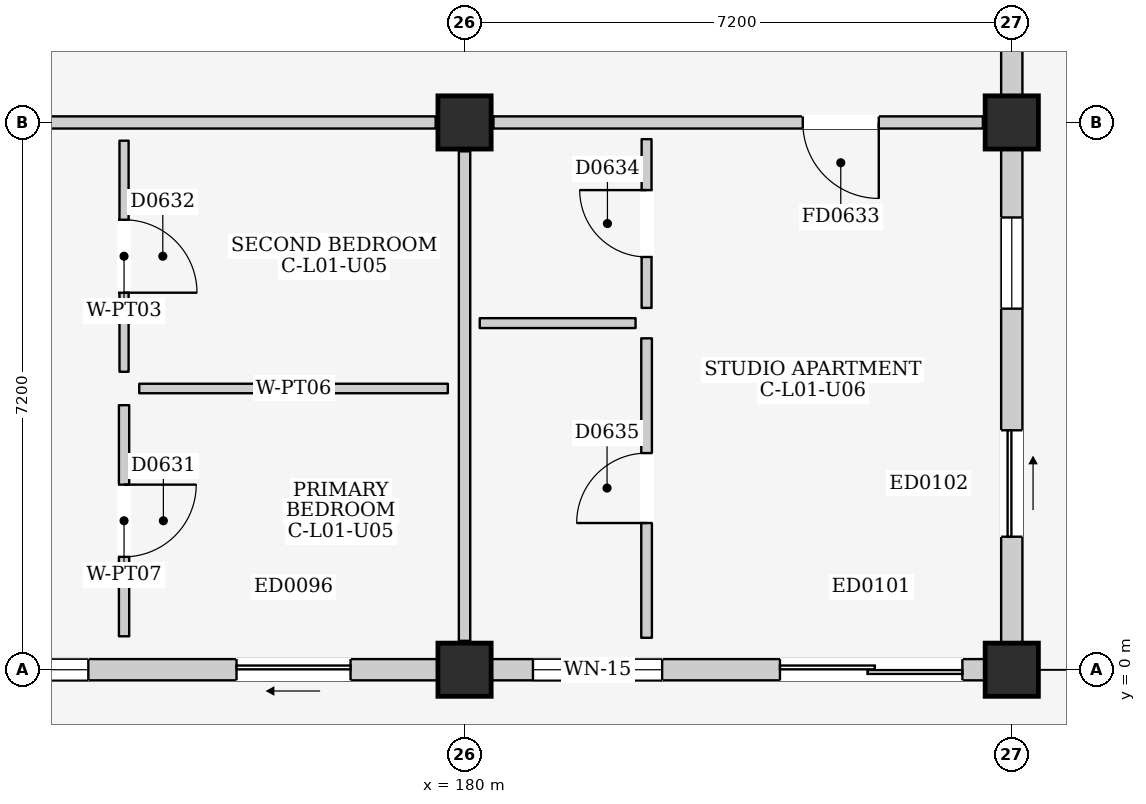
"""IFC4 building model, lengths in metres.
Left out: names, types, materials, properties, quantities, classifications, styles, units other than length and angle.
Written with IfcOpenShell. Run it as: python <this file> out.ifc"""

import sys

from ifc_helpers import new_model, si_unit, direction, frame, frame_2d, origin, origin_2d, place, context, subcontext, project, spatial, rectangle, extrude, element, fill, save


model = new_model("IFC4")
c1 = context("Model", 3, precision=1e-05, world=origin(), true_north=direction((0.0, 1.0)))
c2 = subcontext(c1, "Body", "Model", "MODEL_VIEW")
j1 = project(units=[si_unit("LENGTHUNIT", "METRE"), si_unit("PLANEANGLEUNIT", "RADIAN")], contexts=[c1])
p1 = place(None, origin())
s1 = spatial("IfcSite", under=j1, at=p1, CompositionType="ELEMENT")
p2 = place(p1, origin())
s2 = spatial("IfcBuilding", under=s1, at=p2, CompositionType="ELEMENT")
p3 = place(p2, frame((0.0, 0.0, 4.5)))
s3 = spatial("IfcBuildingStorey", under=s2, at=p3, CompositionType="ELEMENT", Elevation=4.5)
for number, where, z_axis, x_axis in (
    (1, (180.0, 0.0, 0.0), (0.0, 0.0, 1.0), (1.0, 0.0, 0.0)),
    (2, (180.0, 7.2, 0.0), (0.0, 0.0, 1.0), (1.0, 0.0, 0.0)),
    (3, (187.2, 0.0, 0.0), (0.0, 0.0, 1.0), (1.0, 0.0, 0.0)),
    (4, (187.2, 7.2, 0.0), (0.0, 0.0, 1.0), (1.0, 0.0, 0.0)),
):
    element("IfcColumn", number, at=place(p3, frame(where, z_axis=z_axis, x_axis=x_axis)), inside=s3, PredefinedType="COLUMN", context=c2, shape_type="SweptSolid", body=[
        extrude(rectangle(XDim=0.7, YDim=0.7, at=origin_2d()), origin(), (0.0, 0.0, 1.0), 4.5),
    ])
p4 = place(p3, frame((173.15, 0.0, 0.0), z_axis=(0.0, 0.0, 1.0), x_axis=(1.0, 0.0, 0.0)))
e5 = element("IfcWall", 5, at=p4, inside=s3, PredefinedType="ELEMENTEDWALL", context=c2, shape_type="SweptSolid", body=[
    extrude(rectangle(XDim=6.5, YDim=0.28, at=frame_2d((3.25, 0.0))), origin(), (0.0, 0.0, 1.0), 3.715),
])
p5 = place(p4, frame((3.85, 0.0, 0.0)))
e6 = element("IfcOpeningElement", 6, at=p5, cuts=e5, PredefinedType="OPENING", context=c2, shape_type="SweptSolid", body=[
    extrude(rectangle(XDim=1.5, YDim=2.12, at=frame_2d((0.75, 1.06))), frame((0.0, 0.155, 0.0), z_axis=(0.0, -1.0, 0.0), x_axis=(1.0, 0.0, 0.0)), (0.0, 0.0, 1.0), 0.31),
])
p6 = place(p4, frame((0.55, 0.0, 0.9)))
e7 = element("IfcOpeningElement", 7, at=p6, cuts=e5, PredefinedType="OPENING", context=c2, shape_type="SweptSolid", body=[
    extrude(rectangle(XDim=1.35, YDim=1.5, at=frame_2d((0.675, 0.75))), frame((0.0, 0.155, 0.0), z_axis=(0.0, -1.0, 0.0), x_axis=(1.0, 0.0, 0.0)), (0.0, 0.0, 1.0), 0.31),
])
p7 = place(p3, frame((180.35, 0.0, 0.0), z_axis=(0.0, 0.0, 1.0), x_axis=(1.0, 0.0, 0.0)))
e8 = element("IfcWall", 8, at=p7, inside=s3, PredefinedType="ELEMENTEDWALL", context=c2, shape_type="SweptSolid", body=[
    extrude(rectangle(XDim=6.5, YDim=0.28, at=frame_2d((3.25, 0.0))), origin(), (0.0, 0.0, 1.0), 3.715),
])
p8 = place(p7, frame((3.8, 0.0, 0.0)))
e9 = element("IfcOpeningElement", 9, at=p8, cuts=e8, PredefinedType="OPENING", context=c2, shape_type="SweptSolid", body=[
    extrude(rectangle(XDim=2.4, YDim=2.12, at=frame_2d((1.2, 1.06))), frame((0.0, 0.155, 0.0), z_axis=(0.0, -1.0, 0.0), x_axis=(1.0, 0.0, 0.0)), (0.0, 0.0, 1.0), 0.31),
])
p9 = place(p7, frame((0.55, 0.0, 0.9)))
e10 = element("IfcOpeningElement", 10, at=p9, cuts=e8, PredefinedType="OPENING", context=c2, shape_type="SweptSolid", body=[
    extrude(rectangle(XDim=1.7, YDim=1.45, at=frame_2d((0.85, 0.725))), frame((0.0, 0.155, 0.0), z_axis=(0.0, -1.0, 0.0), x_axis=(1.0, 0.0, 0.0)), (0.0, 0.0, 1.0), 0.31),
])
p10 = place(p3, frame((187.2, 0.35, 0.0), z_axis=(0.0, 0.0, 1.0), x_axis=(0.0, 1.0, 0.0)))
e11 = element("IfcWall", 11, at=p10, inside=s3, PredefinedType="ELEMENTEDWALL", context=c2, shape_type="SweptSolid", body=[
    extrude(rectangle(XDim=6.5, YDim=0.28, at=frame_2d((3.25, 0.0))), origin(), (0.0, 0.0, 1.0), 3.715),
])
p11 = place(p10, frame((1.4, 0.0, 0.0)))
e12 = element("IfcOpeningElement", 12, at=p11, cuts=e11, PredefinedType="OPENING", context=c2, shape_type="SweptSolid", body=[
    extrude(rectangle(XDim=1.4, YDim=2.1, at=frame_2d((0.7, 1.05))), frame((0.0, 0.155, 0.0), z_axis=(0.0, -1.0, 0.0), x_axis=(1.0, 0.0, 0.0)), (0.0, 0.0, 1.0), 0.31),
])
p12 = place(p10, frame((4.4, 0.0, 0.95)))
e13 = element("IfcOpeningElement", 13, at=p12, cuts=e11, PredefinedType="OPENING", context=c2, shape_type="SweptSolid", body=[
    extrude(rectangle(XDim=1.2, YDim=1.35, at=frame_2d((0.6, 0.675))), frame((0.0, 0.155, 0.0), z_axis=(0.0, -1.0, 0.0), x_axis=(1.0, 0.0, 0.0)), (0.0, 0.0, 1.0), 0.31),
])
p13 = place(p3, frame((187.2, 7.55, 0.0), z_axis=(0.0, 0.0, 1.0), x_axis=(0.0, 1.0, 0.0)))
e14 = element("IfcWall", 14, at=p13, inside=s3, PredefinedType="ELEMENTEDWALL", context=c2, shape_type="SweptSolid", body=[
    extrude(rectangle(XDim=6.5, YDim=0.28, at=frame_2d((3.25, 0.0))), origin(), (0.0, 0.0, 1.0), 3.715),
])
p14 = place(p13, frame((3.65, 0.0, 0.0)))
e15 = element("IfcOpeningElement", 15, at=p14, cuts=e14, PredefinedType="OPENING", context=c2, shape_type="SweptSolid", body=[
    extrude(rectangle(XDim=1.4, YDim=2.1, at=frame_2d((0.7, 1.05))), frame((0.0, 0.155, 0.0), z_axis=(0.0, -1.0, 0.0), x_axis=(1.0, 0.0, 0.0)), (0.0, 0.0, 1.0), 0.31),
])
p15 = place(p3, frame((173.18, 7.2, 0.0), z_axis=(0.0, 0.0, 1.0), x_axis=(1.0, 0.0, 0.0)))
e16 = element("IfcWall", 16, at=p15, inside=s3, PredefinedType="PARTITIONING", context=c2, shape_type="SweptSolid", body=[
    extrude(rectangle(XDim=6.44, YDim=0.16, at=frame_2d((3.22, 0.0))), origin(), (0.0, 0.0, 1.0), 3.635),
])
p16 = place(p15, frame((0.18, 0.0, 0.0)))
e17 = element("IfcOpeningElement", 17, at=p16, cuts=e16, PredefinedType="OPENING", context=c2, shape_type="SweptSolid", body=[
    extrude(rectangle(XDim=1.0, YDim=2.15, at=frame_2d((0.5, 1.075))), frame((0.0, 0.095, 0.0), z_axis=(0.0, -1.0, 0.0), x_axis=(1.0, 0.0, 0.0)), (0.0, 0.0, 1.0), 0.19),
])
p17 = place(p3, frame((180.0, 0.38, 0.0), z_axis=(0.0, 0.0, 1.0), x_axis=(0.0, 1.0, 0.0)))
e18 = element("IfcWall", 18, at=p17, inside=s3, PredefinedType="PARTITIONING", context=c2, shape_type="SweptSolid", body=[
    extrude(rectangle(XDim=6.44, YDim=0.15, at=frame_2d((3.22, 0.0))), origin(), (0.0, 0.0, 1.0), 3.685),
])
p18 = place(p3, frame((175.52, 0.44, 0.0), z_axis=(0.0, 0.0, 1.0), x_axis=(0.0, 1.0, 0.0)))
e19 = element("IfcWall", 19, at=p18, inside=s3, PredefinedType="PARTITIONING", context=c2, shape_type="SweptSolid", body=[
    extrude(rectangle(XDim=3.04, YDim=0.135, at=frame_2d((1.52, 0.0))), origin(), (0.0, 0.0, 1.0), 4.25),
])
p19 = place(p18, frame((1.045, 0.0, 0.0)))
e20 = element("IfcOpeningElement", 20, at=p19, cuts=e19, PredefinedType="OPENING", context=c2, shape_type="SweptSolid", body=[
    extrude(rectangle(XDim=0.95, YDim=2.15, at=frame_2d((0.475, 1.075))), frame((0.0, 0.083, 0.0), z_axis=(0.0, -1.0, 0.0), x_axis=(1.0, 0.0, 0.0)), (0.0, 0.0, 1.0), 0.165),
])
p20 = place(p3, frame((175.72, 3.7, 0.0), z_axis=(0.0, 0.0, 1.0), x_axis=(1.0, 0.0, 0.0)))
e21 = element("IfcWall", 21, at=p20, inside=s3, PredefinedType="PARTITIONING", context=c2, shape_type="SweptSolid", body=[
    extrude(rectangle(XDim=4.06, YDim=0.125, at=frame_2d((2.03, 0.0))), origin(), (0.0, 0.0, 1.0), 4.25),
])
p21 = place(p3, frame((175.52, 3.92, 0.0), z_axis=(0.0, 0.0, 1.0), x_axis=(0.0, 1.0, 0.0)))
e22 = element("IfcWall", 22, at=p21, inside=s3, PredefinedType="PARTITIONING", context=c2, shape_type="SweptSolid", body=[
    extrude(rectangle(XDim=3.04, YDim=0.12, at=frame_2d((1.52, 0.0))), origin(), (0.0, 0.0, 1.0), 4.25),
])
p22 = place(p21, frame((1.04, 0.0, 0.0)))
e23 = element("IfcOpeningElement", 23, at=p22, cuts=e22, PredefinedType="OPENING", context=c2, shape_type="SweptSolid", body=[
    extrude(rectangle(XDim=0.96, YDim=2.15, at=frame_2d((0.48, 1.075))), frame((0.0, 0.075, 0.0), z_axis=(0.0, -1.0, 0.0), x_axis=(1.0, 0.0, 0.0)), (0.0, 0.0, 1.0), 0.15),
])
p23 = place(p3, frame((180.38, 7.2, 0.0), z_axis=(0.0, 0.0, 1.0), x_axis=(1.0, 0.0, 0.0)))
e24 = element("IfcWall", 24, at=p23, inside=s3, PredefinedType="PARTITIONING", context=c2, shape_type="SweptSolid", body=[
    extrude(rectangle(XDim=6.44, YDim=0.16, at=frame_2d((3.22, 0.0))), origin(), (0.0, 0.0, 1.0), 3.635),
])
p24 = place(p23, frame((4.07, 0.0, 0.0)))
e25 = element("IfcOpeningElement", 25, at=p24, cuts=e24, PredefinedType="OPENING", context=c2, shape_type="SweptSolid", body=[
    extrude(rectangle(XDim=1.0, YDim=2.15, at=frame_2d((0.5, 1.075))), frame((0.0, 0.095, 0.0), z_axis=(0.0, -1.0, 0.0), x_axis=(1.0, 0.0, 0.0)), (0.0, 0.0, 1.0), 0.19),
])
p25 = place(p3, frame((180.2, 4.56, 0.0), z_axis=(0.0, 0.0, 1.0), x_axis=(1.0, 0.0, 0.0)))
e26 = element("IfcWall", 26, at=p25, inside=s3, PredefinedType="PARTITIONING", context=c2, shape_type="SweptSolid", body=[
    extrude(rectangle(XDim=2.05, YDim=0.13, at=frame_2d((1.025, 0.0))), origin(), (0.0, 0.0, 1.0), 4.25),
])
p26 = place(p3, frame((182.395, 4.76, 0.0), z_axis=(0.0, 0.0, 1.0), x_axis=(0.0, 1.0, 0.0)))
e27 = element("IfcWall", 27, at=p26, inside=s3, PredefinedType="PARTITIONING", context=c2, shape_type="SweptSolid", body=[
    extrude(rectangle(XDim=2.22, YDim=0.13, at=frame_2d((1.11, 0.0))), origin(), (0.0, 0.0, 1.0), 4.25),
])
p27 = place(p26, frame((0.67, 0.0, 0.0)))
e28 = element("IfcOpeningElement", 28, at=p27, cuts=e27, PredefinedType="OPENING", context=c2, shape_type="SweptSolid", body=[
    extrude(rectangle(XDim=0.88, YDim=2.1, at=frame_2d((0.44, 1.05))), frame((0.0, 0.08, 0.0), z_axis=(0.0, -1.0, 0.0), x_axis=(1.0, 0.0, 0.0)), (0.0, 0.0, 1.0), 0.16),
])
p28 = place(p3, frame((182.395, 0.42, 0.0), z_axis=(0.0, 0.0, 1.0), x_axis=(0.0, 1.0, 0.0)))
e29 = element("IfcWall", 29, at=p28, inside=s3, PredefinedType="PARTITIONING", context=c2, shape_type="SweptSolid", body=[
    extrude(rectangle(XDim=3.94, YDim=0.14, at=frame_2d((1.97, 0.0))), origin(), (0.0, 0.0, 1.0), 4.25),
])
p29 = place(p28, frame((1.51, 0.0, 0.0)))
e30 = element("IfcOpeningElement", 30, at=p29, cuts=e29, PredefinedType="OPENING", context=c2, shape_type="SweptSolid", body=[
    extrude(rectangle(XDim=0.92, YDim=2.1, at=frame_2d((0.46, 1.05))), frame((0.0, 0.085, 0.0), z_axis=(0.0, -1.0, 0.0), x_axis=(1.0, 0.0, 0.0)), (0.0, 0.0, 1.0), 0.17),
])
p30 = place(p5, frame((1.5, 0.0, 0.0), z_axis=(0.0, 0.0, 1.0), x_axis=(-1.0, 0.0, 0.0)))
e31 = element("IfcDoor", 31, at=p30, inside=s3, OperationType="SLIDING_TO_LEFT", PredefinedType="DOOR", context=c2, shape_type="SweptSolid", body=[
    extrude(rectangle(XDim=1.5, YDim=2.12, at=frame_2d((0.75, 1.06))), frame((0.0, 0.025, 0.0), z_axis=(0.0, -1.0, 0.0), x_axis=(1.0, 0.0, 0.0)), (0.0, 0.0, 1.0), 0.05),
])
fill(e6, e31)
p31 = place(p6, origin())
e32 = element("IfcWindow", 32, at=p31, inside=s3, PartitioningType="SINGLE_PANEL", PredefinedType="WINDOW", context=c2, shape_type="SweptSolid", body=[
    extrude(rectangle(XDim=1.35, YDim=1.5, at=frame_2d((0.675, 0.75))), frame((0.0, 0.03, 0.0), z_axis=(0.0, -1.0, 0.0), x_axis=(1.0, 0.0, 0.0)), (0.0, 0.0, 1.0), 0.06),
])
fill(e7, e32)
p32 = place(p8, frame((2.4, 0.0, 0.0), z_axis=(0.0, 0.0, 1.0), x_axis=(-1.0, 0.0, 0.0)))
e33 = element("IfcDoor", 33, at=p32, inside=s3, OperationType="DOUBLE_DOOR_SLIDING", PredefinedType="DOOR", context=c2, shape_type="SweptSolid", body=[
    extrude(rectangle(XDim=2.4, YDim=2.12, at=frame_2d((1.2, 1.06))), frame((0.0, 0.025, 0.0), z_axis=(0.0, -1.0, 0.0), x_axis=(1.0, 0.0, 0.0)), (0.0, 0.0, 1.0), 0.05),
])
fill(e9, e33)
p33 = place(p9, origin())
e34 = element("IfcWindow", 34, at=p33, inside=s3, PartitioningType="DOUBLE_PANEL_VERTICAL", PredefinedType="WINDOW", context=c2, shape_type="SweptSolid", body=[
    extrude(rectangle(XDim=1.7, YDim=1.45, at=frame_2d((0.85, 0.725))), frame((0.0, 0.03, 0.0), z_axis=(0.0, -1.0, 0.0), x_axis=(1.0, 0.0, 0.0)), (0.0, 0.0, 1.0), 0.06),
])
fill(e10, e34)
p34 = place(p11, frame((1.4, 0.0, 0.0), z_axis=(0.0, 0.0, 1.0), x_axis=(-1.0, 0.0, 0.0)))
e35 = element("IfcDoor", 35, at=p34, inside=s3, OperationType="SLIDING_TO_RIGHT", PredefinedType="DOOR", context=c2, shape_type="SweptSolid", body=[
    extrude(rectangle(XDim=1.4, YDim=2.1, at=frame_2d((0.7, 1.05))), frame((0.0, 0.025, 0.0), z_axis=(0.0, -1.0, 0.0), x_axis=(1.0, 0.0, 0.0)), (0.0, 0.0, 1.0), 0.05),
])
fill(e12, e35)
p35 = place(p12, origin())
e36 = element("IfcWindow", 36, at=p35, inside=s3, PartitioningType="SINGLE_PANEL", PredefinedType="WINDOW", context=c2, shape_type="SweptSolid", body=[
    extrude(rectangle(XDim=1.2, YDim=1.35, at=frame_2d((0.6, 0.675))), frame((0.0, 0.03, 0.0), z_axis=(0.0, -1.0, 0.0), x_axis=(1.0, 0.0, 0.0)), (0.0, 0.0, 1.0), 0.06),
])
fill(e13, e36)
p36 = place(p19, frame((0.95, 0.0, 0.0), z_axis=(0.0, 0.0, 1.0), x_axis=(-1.0, 0.0, 0.0)))
e37 = element("IfcDoor", 37, at=p36, inside=s3, OperationType="SINGLE_SWING_LEFT", PredefinedType="DOOR", context=c2, shape_type="SweptSolid", body=[
    extrude(rectangle(XDim=0.95, YDim=2.15, at=frame_2d((0.475, 1.075))), frame((0.0, 0.025, 0.0), z_axis=(0.0, -1.0, 0.0), x_axis=(1.0, 0.0, 0.0)), (0.0, 0.0, 1.0), 0.05),
])
fill(e20, e37)
p37 = place(p22, frame((0.96, 0.0, 0.0), z_axis=(0.0, 0.0, 1.0), x_axis=(-1.0, 0.0, 0.0)))
e38 = element("IfcDoor", 38, at=p37, inside=s3, OperationType="SINGLE_SWING_RIGHT", PredefinedType="DOOR", context=c2, shape_type="SweptSolid", body=[
    extrude(rectangle(XDim=0.96, YDim=2.15, at=frame_2d((0.48, 1.075))), frame((0.0, 0.025, 0.0), z_axis=(0.0, -1.0, 0.0), x_axis=(1.0, 0.0, 0.0)), (0.0, 0.0, 1.0), 0.05),
])
fill(e23, e38)
p38 = place(p24, frame((1.0, 0.0, 0.0), z_axis=(0.0, 0.0, 1.0), x_axis=(-1.0, 0.0, 0.0)))
e39 = element("IfcDoor", 39, at=p38, inside=s3, OperationType="SINGLE_SWING_LEFT", PredefinedType="DOOR", context=c2, shape_type="SweptSolid", body=[
    extrude(rectangle(XDim=1.0, YDim=2.15, at=frame_2d((0.5, 1.075))), frame((0.0, 0.025, 0.0), z_axis=(0.0, -1.0, 0.0), x_axis=(1.0, 0.0, 0.0)), (0.0, 0.0, 1.0), 0.05),
])
fill(e25, e39)
p39 = place(p27, origin())
e40 = element("IfcDoor", 40, at=p39, inside=s3, OperationType="SINGLE_SWING_RIGHT", PredefinedType="DOOR", context=c2, shape_type="SweptSolid", body=[
    extrude(rectangle(XDim=0.88, YDim=2.1, at=frame_2d((0.44, 1.05))), frame((0.0, 0.025, 0.0), z_axis=(0.0, -1.0, 0.0), x_axis=(1.0, 0.0, 0.0)), (0.0, 0.0, 1.0), 0.05),
])
fill(e28, e40)
p40 = place(p29, origin())
e41 = element("IfcDoor", 41, at=p40, inside=s3, OperationType="SINGLE_SWING_LEFT", PredefinedType="DOOR", context=c2, shape_type="SweptSolid", body=[
    extrude(rectangle(XDim=0.92, YDim=2.1, at=frame_2d((0.46, 1.05))), frame((0.0, 0.025, 0.0), z_axis=(0.0, -1.0, 0.0), x_axis=(1.0, 0.0, 0.0)), (0.0, 0.0, 1.0), 0.05),
])
fill(e30, e41)
save(model, sys.argv[1])
